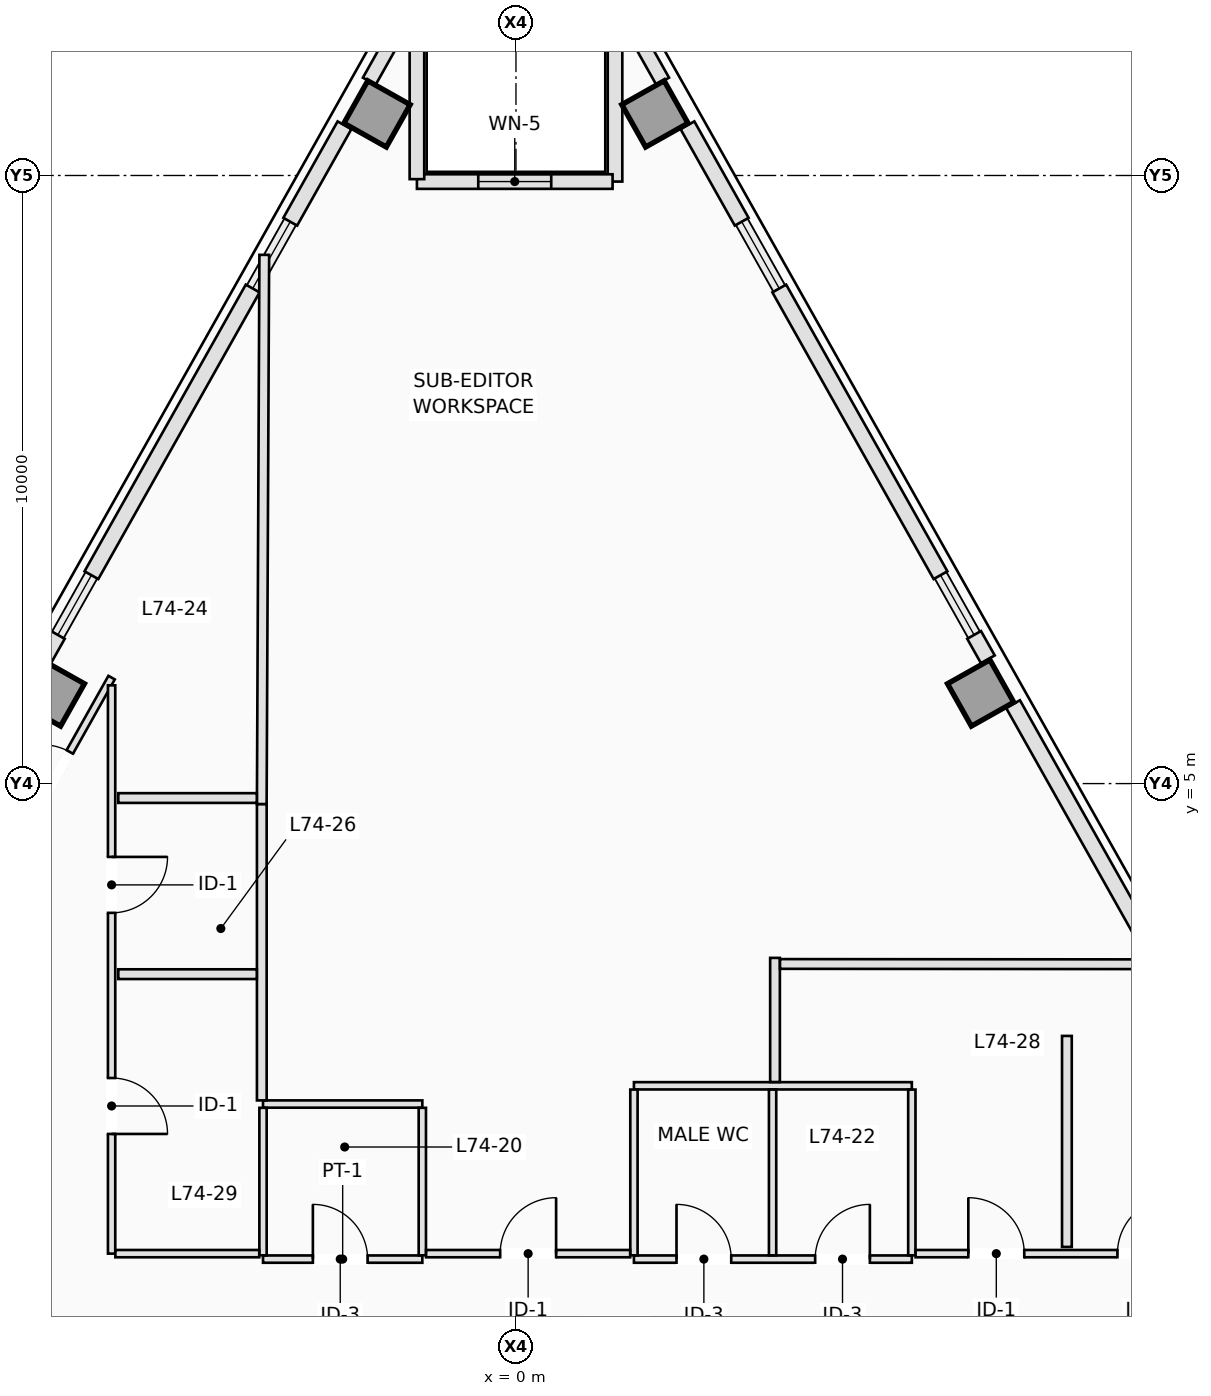
"""IFC4 building model, lengths in metres.
Left out: names, types, materials, properties, quantities, classifications, styles, units other than length and angle.
Written with IfcOpenShell. Run it as: python <this file> out.ifc"""

import sys

from ifc_helpers import new_model, si_unit, direction, frame, frame_2d, origin, origin_2d, place, context, subcontext, project, spatial, rectangle, extrude, element, fill, save


model = new_model("IFC4")
c1 = context("Model", 3, precision=1e-05, world=origin(), true_north=direction((0.0, 1.0)))
c2 = subcontext(c1, "Body", "Model", "MODEL_VIEW")
j1 = project(units=[si_unit("LENGTHUNIT", "METRE"), si_unit("PLANEANGLEUNIT", "RADIAN")], contexts=[c1])
p1 = place(None, origin())
s1 = spatial("IfcSite", under=j1, at=p1, CompositionType="ELEMENT")
p2 = place(p1, origin())
s2 = spatial("IfcBuilding", under=s1, at=p2, CompositionType="ELEMENT")
p3 = place(p2, frame((0.0, 0.0, 267.4)))
s3 = spatial("IfcBuildingStorey", under=s2, at=p3, CompositionType="ELEMENT", Elevation=267.4)
for number, where, z_axis, x_axis in (
    (1, (7.642, 6.489, 0.0), (0.0, 0.0, 1.0), (0.872, 0.49, 0.0)),
    (2, (2.285, 16.012, 0.0), (0.0, 0.0, 1.0), (0.872, 0.49, 0.0)),
    (3, (-2.285, 16.012, 0.0), (0.0, 0.0, 1.0), (-0.872, 0.49, 0.0)),
    (4, (-7.642, 6.489, 0.0), (0.0, 0.0, 1.0), (-0.872, 0.49, 0.0)),
):
    element("IfcColumn", number, at=place(p3, frame(where, z_axis=z_axis, x_axis=x_axis)), inside=s3, PredefinedType="COLUMN", context=c2, shape_type="SweptSolid", body=[
        extrude(rectangle(XDim=0.8, YDim=0.8, at=origin_2d()), origin(), (0.0, 0.0, 1.0), 3.5),
    ])
p4 = place(p3, frame((1.95, 17.373, 0.0), z_axis=(0.0, 0.0, 1.0), x_axis=(0.490199895283, -0.871610040479, 0.0)))
e5 = element("IfcWall", 5, at=p4, inside=s3, PredefinedType="STANDARD", context=c2, shape_type="SweptSolid", body=[
    extrude(rectangle(XDim=0.945, YDim=0.24, at=frame_2d((0.472, 0.0))), origin(), (0.0, 0.0, 1.0), 3.18),
])
p5 = place(p3, frame((2.82, 15.826, 0.0), z_axis=(0.0, 0.0, 1.0), x_axis=(0.490261239633, -0.871575537125, 0.0)))
e6 = element("IfcWall", 6, at=p5, inside=s3, PredefinedType="STANDARD", context=c2, shape_type="SweptSolid", body=[
    extrude(rectangle(XDim=1.82, YDim=0.26, at=frame_2d((0.91, 0.0))), origin(), (0.0, 0.0, 1.0), 3.18),
])
p6 = place(p3, frame((4.33, 13.142, 0.0), z_axis=(0.0, 0.0, 1.0), x_axis=(0.490265525523, -0.871573126297, 0.0)))
e7 = element("IfcWall", 7, at=p6, inside=s3, PredefinedType="STANDARD", context=c2, shape_type="SweptSolid", body=[
    extrude(rectangle(XDim=5.409, YDim=0.26, at=frame_2d((2.705, 0.0))), origin(), (0.0, 0.0, 1.0), 3.18),
])
p7 = place(p3, frame((7.534, 7.445, 0.0), z_axis=(0.0, 0.0, 1.0), x_axis=(0.490412424957, -0.871490478116, 0.0)))
e8 = element("IfcWall", 8, at=p7, inside=s3, PredefinedType="STANDARD", context=c2, shape_type="SweptSolid", body=[
    extrude(rectangle(XDim=0.46, YDim=0.26, at=frame_2d((0.23, 0.0))), origin(), (0.0, 0.0, 1.0), 3.18),
])
p8 = place(p3, frame((8.174, 6.307, 0.0), z_axis=(0.0, 0.0, 1.0), x_axis=(0.490269447258, -0.871570920284, 0.0)))
e9 = element("IfcWall", 9, at=p8, inside=s3, PredefinedType="STANDARD", context=c2, shape_type="SweptSolid", body=[
    extrude(rectangle(XDim=4.237, YDim=0.26, at=frame_2d((2.118, 0.0))), origin(), (0.0, 0.0, 1.0), 3.18),
])
p9 = place(p3, frame((-2.413, 16.549, 0.0), z_axis=(0.0, 0.0, 1.0), x_axis=(0.490199895283, 0.871610040479, 0.0)))
e10 = element("IfcWall", 10, at=p9, inside=s3, PredefinedType="STANDARD", context=c2, shape_type="SweptSolid", body=[
    extrude(rectangle(XDim=0.945, YDim=0.24, at=frame_2d((0.472, 0.0))), origin(), (0.0, 0.0, 1.0), 3.18),
])
p10 = place(p3, frame((-7.76, 7.044, 0.0), z_axis=(0.0, 0.0, 1.0), x_axis=(0.490412424957, 0.871490478116, 0.0)))
e11 = element("IfcWall", 11, at=p10, inside=s3, PredefinedType="STANDARD", context=c2, shape_type="SweptSolid", body=[
    extrude(rectangle(XDim=0.46, YDim=0.26, at=frame_2d((0.23, 0.0))), origin(), (0.0, 0.0, 1.0), 3.18),
])
p11 = place(p3, frame((-6.982, 8.427, 0.0), z_axis=(0.0, 0.0, 1.0), x_axis=(0.490265525523, 0.871573126297, 0.0)))
e12 = element("IfcWall", 12, at=p11, inside=s3, PredefinedType="STANDARD", context=c2, shape_type="SweptSolid", body=[
    extrude(rectangle(XDim=5.409, YDim=0.26, at=frame_2d((2.705, 0.0))), origin(), (0.0, 0.0, 1.0), 3.18),
])
p12 = place(p3, frame((-3.712, 14.24, 0.0), z_axis=(0.0, 0.0, 1.0), x_axis=(0.490261239633, 0.871575537125, 0.0)))
e13 = element("IfcWall", 13, at=p12, inside=s3, PredefinedType="STANDARD", context=c2, shape_type="SweptSolid", body=[
    extrude(rectangle(XDim=1.82, YDim=0.26, at=frame_2d((0.91, 0.0))), origin(), (0.0, 0.0, 1.0), 3.18),
])
p13 = place(p3, frame((1.629, 17.4, 0.0), z_axis=(0.0, 0.0, 1.0), x_axis=(0.0, -1.0, 0.0)))
e14 = element("IfcWall", 14, at=p13, inside=s3, PredefinedType="STANDARD", context=c2, shape_type="SweptSolid", body=[
    extrude(rectangle(XDim=2.5, YDim=0.24, at=frame_2d((1.25, 0.0))), origin(), (0.0, 0.0, 1.0), 3.18),
])
p14 = place(p3, frame((1.589, 14.9, 0.0), z_axis=(0.0, 0.0, 1.0), x_axis=(-1.0, 0.0, 0.0)))
e15 = element("IfcWall", 15, at=p14, inside=s3, PredefinedType="STANDARD", context=c2, shape_type="SweptSolid", body=[
    extrude(rectangle(XDim=3.218, YDim=0.24, at=frame_2d((1.609, 0.0))), origin(), (0.0, 0.0, 1.0), 3.18),
])
p15 = place(p14, frame((1.009, 0.0, 0.9)))
e16 = element("IfcOpeningElement", 16, at=p15, cuts=e15, PredefinedType="OPENING", context=c2, shape_type="SweptSolid", body=[
    extrude(rectangle(XDim=1.2, YDim=1.8, at=frame_2d((0.6, 0.9))), frame((0.0, 0.13, 0.0), z_axis=(0.0, -1.0, 0.0), x_axis=(1.0, 0.0, 0.0)), (0.0, 0.0, 1.0), 0.26),
])
p16 = place(p3, frame((-1.629, 14.94, 0.0), z_axis=(0.0, 0.0, 1.0), x_axis=(0.0, 1.0, 0.0)))
e17 = element("IfcWall", 17, at=p16, inside=s3, PredefinedType="STANDARD", context=c2, shape_type="SweptSolid", body=[
    extrude(rectangle(XDim=2.46, YDim=0.24, at=frame_2d((1.23, 0.0))), origin(), (0.0, 0.0, 1.0), 3.18),
])
p17 = place(p3, frame((-4.16, -2.82, 0.0), z_axis=(0.0, 0.0, 1.0), x_axis=(1.0, 0.0, 0.0)))
e18 = element("IfcWall", 18, at=p17, inside=s3, PredefinedType="PARTITIONING", context=c2, shape_type="SweptSolid", body=[
    extrude(rectangle(XDim=2.62, YDim=0.12, at=frame_2d((1.31, 0.0))), origin(), (0.0, 0.0, 1.0), 2.873),
])
p18 = place(p17, frame((0.82, 0.0, 0.0)))
e19 = element("IfcOpeningElement", 19, at=p18, cuts=e18, PredefinedType="OPENING", context=c2, shape_type="SweptSolid", body=[
    extrude(rectangle(XDim=0.9, YDim=2.12, at=frame_2d((0.45, 1.06))), frame((0.0, 0.07, 0.0), z_axis=(0.0, -1.0, 0.0), x_axis=(1.0, 0.0, 0.0)), (0.0, 0.0, 1.0), 0.14),
])
p19 = place(p3, frame((-4.16, -0.27, 0.0), z_axis=(0.0, 0.0, 1.0), x_axis=(1.0, 0.0, 0.0)))
e20 = element("IfcWall", 20, at=p19, inside=s3, PredefinedType="PARTITIONING", context=c2, shape_type="SweptSolid", body=[
    extrude(rectangle(XDim=2.62, YDim=0.12, at=frame_2d((1.31, 0.0))), origin(), (0.0, 0.0, 1.0), 3.18),
])
for number, where, z_axis, x_axis in (
    (21, (-4.16, -2.758, 0.0), (0.0, 0.0, 1.0), (0.0, 1.0, 0.0)),
    (22, (-1.54, -2.758, 0.0), (0.0, 0.0, 1.0), (0.0, 1.0, 0.0)),
):
    element("IfcWall", number, at=place(p3, frame(where, z_axis=z_axis, x_axis=x_axis)), inside=s3, PredefinedType="PARTITIONING", context=c2, shape_type="SweptSolid", body=[
        extrude(rectangle(XDim=2.426, YDim=0.12, at=frame_2d((1.213, 0.0))), origin(), (0.0, 0.0, 1.0), 3.18),
    ])
p20 = place(p3, frame((1.94, -2.82, 0.0), z_axis=(0.0, 0.0, 1.0), x_axis=(1.0, 0.0, 0.0)))
e23 = element("IfcWall", 23, at=p20, inside=s3, PredefinedType="PARTITIONING", context=c2, shape_type="SweptSolid", body=[
    extrude(rectangle(XDim=4.57, YDim=0.12, at=frame_2d((2.285, 0.0))), origin(), (0.0, 0.0, 1.0), 2.873),
])
p21 = place(p20, frame((0.7, 0.0, 0.0)))
e24 = element("IfcOpeningElement", 24, at=p21, cuts=e23, PredefinedType="OPENING", context=c2, shape_type="SweptSolid", body=[
    extrude(rectangle(XDim=0.9, YDim=2.12, at=frame_2d((0.45, 1.06))), frame((0.0, 0.07, 0.0), z_axis=(0.0, -1.0, 0.0), x_axis=(1.0, 0.0, 0.0)), (0.0, 0.0, 1.0), 0.14),
])
p22 = place(p20, frame((2.98, 0.0, 0.0)))
e25 = element("IfcOpeningElement", 25, at=p22, cuts=e23, PredefinedType="OPENING", context=c2, shape_type="SweptSolid", body=[
    extrude(rectangle(XDim=0.9, YDim=2.12, at=frame_2d((0.45, 1.06))), frame((0.0, 0.07, 0.0), z_axis=(0.0, -1.0, 0.0), x_axis=(1.0, 0.0, 0.0)), (0.0, 0.0, 1.0), 0.14),
])
p23 = place(p3, frame((1.94, 0.03, 0.0), z_axis=(0.0, 0.0, 1.0), x_axis=(1.0, 0.0, 0.0)))
e26 = element("IfcWall", 26, at=p23, inside=s3, PredefinedType="PARTITIONING", context=c2, shape_type="SweptSolid", body=[
    extrude(rectangle(XDim=4.57, YDim=0.12, at=frame_2d((2.285, 0.0))), origin(), (0.0, 0.0, 1.0), 3.18),
])
for number, where, z_axis, x_axis in (
    (27, (1.94, -2.758, 0.0), (0.0, 0.0, 1.0), (0.0, 1.0, 0.0)),
    (28, (4.22, -2.758, 0.0), (0.0, 0.0, 1.0), (0.0, 1.0, 0.0)),
    (29, (6.51, -2.758, 0.0), (0.0, 0.0, 1.0), (0.0, 1.0, 0.0)),
):
    element("IfcWall", number, at=place(p3, frame(where, z_axis=z_axis, x_axis=x_axis)), inside=s3, PredefinedType="PARTITIONING", context=c2, shape_type="SweptSolid", body=[
        extrude(rectangle(XDim=2.726, YDim=0.12, at=frame_2d((1.363, 0.0))), origin(), (0.0, 0.0, 1.0), 3.18),
    ])
p24 = place(p3, frame((-8.049, 4.256, 0.0), z_axis=(0.0, 0.0, 1.0), x_axis=(0.490249053239, 0.871582391859, 0.0)))
e30 = element("IfcWall", 30, at=p24, inside=s3, PredefinedType="PARTITIONING", context=c2, shape_type="SweptSolid", body=[
    extrude(rectangle(XDim=2.854, YDim=0.12, at=frame_2d((1.427, 0.0))), origin(), (0.0, 0.0, 1.0), 3.18),
])
p25 = place(p24, frame((0.531, 0.0, 0.0)))
e31 = element("IfcOpeningElement", 31, at=p25, cuts=e30, PredefinedType="OPENING", context=c2, shape_type="SweptSolid", body=[
    extrude(rectangle(XDim=0.92, YDim=2.12, at=frame_2d((0.46, 1.06))), frame((0.0, 0.07, 0.0), z_axis=(0.0, -1.0, 0.0), x_axis=(1.0, 0.0, 0.0)), (0.0, 0.0, 1.0), 0.14),
])
p26 = place(p3, frame((-6.65, 6.616, 0.0), z_axis=(0.0, 0.0, 1.0), x_axis=(0.0, -1.0, 0.0)))
e32 = element("IfcWall", 32, at=p26, inside=s3, PredefinedType="PARTITIONING", context=c2, shape_type="SweptSolid", body=[
    extrude(rectangle(XDim=9.346, YDim=0.12, at=frame_2d((4.673, 0.0))), origin(), (0.0, 0.0, 1.0), 3.18),
])
p27 = place(p26, frame((2.822, 0.0, 0.0)))
e33 = element("IfcOpeningElement", 33, at=p27, cuts=e32, PredefinedType="OPENING", context=c2, shape_type="SweptSolid", body=[
    extrude(rectangle(XDim=0.92, YDim=2.12, at=frame_2d((0.46, 1.06))), frame((0.0, 0.07, 0.0), z_axis=(0.0, -1.0, 0.0), x_axis=(1.0, 0.0, 0.0)), (0.0, 0.0, 1.0), 0.14),
])
p28 = place(p26, frame((6.458, 0.0, 0.0)))
e34 = element("IfcOpeningElement", 34, at=p28, cuts=e32, PredefinedType="OPENING", context=c2, shape_type="SweptSolid", body=[
    extrude(rectangle(XDim=0.92, YDim=2.12, at=frame_2d((0.46, 1.06))), frame((0.0, 0.07, 0.0), z_axis=(0.0, -1.0, 0.0), x_axis=(1.0, 0.0, 0.0)), (0.0, 0.0, 1.0), 0.14),
])
p29 = place(p3, frame((-6.588, -2.73, 0.0), z_axis=(0.0, 0.0, 1.0), x_axis=(1.0, 0.0, 0.0)))
e35 = element("IfcWall", 35, at=p29, inside=s3, PredefinedType="PARTITIONING", context=c2, shape_type="SweptSolid", body=[
    extrude(rectangle(XDim=2.366, YDim=0.12, at=frame_2d((1.183, 0.0))), origin(), (0.0, 0.0, 1.0), 3.18),
])
p30 = place(p3, frame((-1.478, -2.73, 0.0), z_axis=(0.0, 0.0, 1.0), x_axis=(1.0, 0.0, 0.0)))
e36 = element("IfcWall", 36, at=p30, inside=s3, PredefinedType="PARTITIONING", context=c2, shape_type="SweptSolid", body=[
    extrude(rectangle(XDim=3.356, YDim=0.12, at=frame_2d((1.678, 0.0))), origin(), (0.0, 0.0, 1.0), 2.873),
])
p31 = place(p30, frame((1.218, 0.0, 0.0)))
e37 = element("IfcOpeningElement", 37, at=p31, cuts=e36, PredefinedType="OPENING", context=c2, shape_type="SweptSolid", body=[
    extrude(rectangle(XDim=0.92, YDim=2.12, at=frame_2d((0.46, 1.06))), frame((0.0, 0.07, 0.0), z_axis=(0.0, -1.0, 0.0), x_axis=(1.0, 0.0, 0.0)), (0.0, 0.0, 1.0), 0.14),
])
p32 = place(p3, frame((6.572, -2.73, 0.0), z_axis=(0.0, 0.0, 1.0), x_axis=(1.0, 0.0, 0.0)))
e38 = element("IfcWall", 38, at=p32, inside=s3, PredefinedType="PARTITIONING", context=c2, shape_type="SweptSolid", body=[
    extrude(rectangle(XDim=5.328, YDim=0.12, at=frame_2d((2.664, 0.0))), origin(), (0.0, 0.0, 1.0), 3.18),
])
p33 = place(p32, frame((0.867, 0.0, 0.0)))
e39 = element("IfcOpeningElement", 39, at=p33, cuts=e38, PredefinedType="OPENING", context=c2, shape_type="SweptSolid", body=[
    extrude(rectangle(XDim=0.92, YDim=2.12, at=frame_2d((0.46, 1.06))), frame((0.0, 0.07, 0.0), z_axis=(0.0, -1.0, 0.0), x_axis=(1.0, 0.0, 0.0)), (0.0, 0.0, 1.0), 0.14),
])
p34 = place(p32, frame((3.319, 0.0, 0.0)))
e40 = element("IfcOpeningElement", 40, at=p34, cuts=e38, PredefinedType="OPENING", context=c2, shape_type="SweptSolid", body=[
    extrude(rectangle(XDim=0.92, YDim=2.12, at=frame_2d((0.46, 1.06))), frame((0.0, 0.07, 0.0), z_axis=(0.0, -1.0, 0.0), x_axis=(1.0, 0.0, 0.0)), (0.0, 0.0, 1.0), 0.14),
])
p35 = place(p3, frame((-4.139, 13.695, 0.0), z_axis=(0.0, 0.0, 1.0), x_axis=(-0.004567766824, -0.999989567699, 0.0)))
e41 = element("IfcWall", 41, at=p35, inside=s3, PredefinedType="PARTITIONING", context=c2, shape_type="SweptSolid", body=[
    extrude(rectangle(XDim=9.033, YDim=0.16, at=frame_2d((4.516, 0.0))), origin(), (0.0, 0.0, 1.0), 3.18),
])
p36 = place(p3, frame((-4.262, 4.762, 0.0), z_axis=(0.0, 0.0, 1.0), x_axis=(-1.0, 0.0, 0.0)))
e42 = element("IfcWall", 42, at=p36, inside=s3, PredefinedType="PARTITIONING", context=c2, shape_type="SweptSolid", body=[
    extrude(rectangle(XDim=2.278, YDim=0.16, at=frame_2d((1.139, 0.0))), origin(), (0.0, 0.0, 1.0), 2.873),
])
p37 = place(p3, frame((-4.18, -0.21, 0.0), z_axis=(0.0, 0.0, 1.0), x_axis=(0.0, 1.0, 0.0)))
e43 = element("IfcWall", 43, at=p37, inside=s3, PredefinedType="PARTITIONING", context=c2, shape_type="SweptSolid", body=[
    extrude(rectangle(XDim=4.87, YDim=0.16, at=frame_2d((2.435, 0.0))), origin(), (0.0, 0.0, 1.0), 3.18),
])
p38 = place(p3, frame((4.26, 2.134, 0.0), z_axis=(0.0, 0.0, 1.0), x_axis=(0.0, -1.0, 0.0)))
e44 = element("IfcWall", 44, at=p38, inside=s3, PredefinedType="PARTITIONING", context=c2, shape_type="SweptSolid", body=[
    extrude(rectangle(XDim=2.042, YDim=0.16, at=frame_2d((1.021, 0.0))), origin(), (0.0, 0.0, 1.0), 3.18),
])
p39 = place(p3, frame((10.701, 2.029, 0.0), z_axis=(0.0, 0.0, 1.0), x_axis=(-0.999999705232, 0.000767813041, 0.0)))
e45 = element("IfcWall", 45, at=p39, inside=s3, PredefinedType="PARTITIONING", context=c2, shape_type="SweptSolid", body=[
    extrude(rectangle(XDim=6.359, YDim=0.16, at=frame_2d((3.18, 0.0))), origin(), (0.0, 0.0, 1.0), 2.873),
])
p40 = place(p3, frame((-4.262, 1.866, 0.0), z_axis=(0.0, 0.0, 1.0), x_axis=(-1.0, 0.0, 0.0)))
e46 = element("IfcWall", 46, at=p40, inside=s3, PredefinedType="PARTITIONING", context=c2, shape_type="SweptSolid", body=[
    extrude(rectangle(XDim=2.278, YDim=0.16, at=frame_2d((1.139, 0.0))), origin(), (0.0, 0.0, 1.0), 2.873),
])
p41 = place(p3, frame((9.06, 0.85, 0.0), z_axis=(0.0, 0.0, 1.0), x_axis=(0.0, -1.0, 0.0)))
e47 = element("IfcWall", 47, at=p41, inside=s3, PredefinedType="PARTITIONING", context=c2, shape_type="SweptSolid", body=[
    extrude(rectangle(XDim=3.47, YDim=0.16, at=frame_2d((1.735, 0.0))), origin(), (0.0, 0.0, 1.0), 3.18),
])
p42 = place(p15, origin())
e48 = element("IfcWindow", 48, at=p42, inside=s3, PartitioningType="SINGLE_PANEL", PredefinedType="WINDOW", context=c2, shape_type="SweptSolid", body=[
    extrude(rectangle(XDim=1.2, YDim=1.8, at=frame_2d((0.6, 0.9))), frame((0.0, 0.03, 0.0), z_axis=(0.0, -1.0, 0.0), x_axis=(1.0, 0.0, 0.0)), (0.0, 0.0, 1.0), 0.06),
])
fill(e16, e48)
p43 = place(p18, origin())
e49 = element("IfcDoor", 49, at=p43, inside=s3, OperationType="SINGLE_SWING_LEFT", PredefinedType="DOOR", context=c2, shape_type="SweptSolid", body=[
    extrude(rectangle(XDim=0.9, YDim=2.12, at=frame_2d((0.45, 1.06))), frame((0.0, 0.025, 0.0), z_axis=(0.0, -1.0, 0.0), x_axis=(1.0, 0.0, 0.0)), (0.0, 0.0, 1.0), 0.05),
])
fill(e19, e49)
p44 = place(p21, origin())
e50 = element("IfcDoor", 50, at=p44, inside=s3, OperationType="SINGLE_SWING_LEFT", PredefinedType="DOOR", context=c2, shape_type="SweptSolid", body=[
    extrude(rectangle(XDim=0.9, YDim=2.12, at=frame_2d((0.45, 1.06))), frame((0.0, 0.025, 0.0), z_axis=(0.0, -1.0, 0.0), x_axis=(1.0, 0.0, 0.0)), (0.0, 0.0, 1.0), 0.05),
])
fill(e24, e50)
p45 = place(p22, origin())
e51 = element("IfcDoor", 51, at=p45, inside=s3, OperationType="SINGLE_SWING_RIGHT", PredefinedType="DOOR", context=c2, shape_type="SweptSolid", body=[
    extrude(rectangle(XDim=0.9, YDim=2.12, at=frame_2d((0.45, 1.06))), frame((0.0, 0.025, 0.0), z_axis=(0.0, -1.0, 0.0), x_axis=(1.0, 0.0, 0.0)), (0.0, 0.0, 1.0), 0.05),
])
fill(e25, e51)
p46 = place(p25, origin())
e52 = element("IfcDoor", 52, at=p46, inside=s3, OperationType="SINGLE_SWING_LEFT", PredefinedType="DOOR", context=c2, shape_type="SweptSolid", body=[
    extrude(rectangle(XDim=0.92, YDim=2.12, at=frame_2d((0.46, 1.06))), frame((0.0, 0.025, 0.0), z_axis=(0.0, -1.0, 0.0), x_axis=(1.0, 0.0, 0.0)), (0.0, 0.0, 1.0), 0.05),
])
fill(e31, e52)
p47 = place(p31, origin())
e53 = element("IfcDoor", 53, at=p47, inside=s3, OperationType="SINGLE_SWING_RIGHT", PredefinedType="DOOR", context=c2, shape_type="SweptSolid", body=[
    extrude(rectangle(XDim=0.92, YDim=2.12, at=frame_2d((0.46, 1.06))), frame((0.0, 0.025, 0.0), z_axis=(0.0, -1.0, 0.0), x_axis=(1.0, 0.0, 0.0)), (0.0, 0.0, 1.0), 0.05),
])
fill(e37, e53)
p48 = place(p27, origin())
e54 = element("IfcDoor", 54, at=p48, inside=s3, OperationType="SINGLE_SWING_LEFT", PredefinedType="DOOR", context=c2, shape_type="SweptSolid", body=[
    extrude(rectangle(XDim=0.92, YDim=2.12, at=frame_2d((0.46, 1.06))), frame((0.0, 0.025, 0.0), z_axis=(0.0, -1.0, 0.0), x_axis=(1.0, 0.0, 0.0)), (0.0, 0.0, 1.0), 0.05),
])
fill(e33, e54)
p49 = place(p33, origin())
e55 = element("IfcDoor", 55, at=p49, inside=s3, OperationType="SINGLE_SWING_LEFT", PredefinedType="DOOR", context=c2, shape_type="SweptSolid", body=[
    extrude(rectangle(XDim=0.92, YDim=2.12, at=frame_2d((0.46, 1.06))), frame((0.0, 0.025, 0.0), z_axis=(0.0, -1.0, 0.0), x_axis=(1.0, 0.0, 0.0)), (0.0, 0.0, 1.0), 0.05),
])
fill(e39, e55)
p50 = place(p28, origin())
e56 = element("IfcDoor", 56, at=p50, inside=s3, OperationType="SINGLE_SWING_RIGHT", PredefinedType="DOOR", context=c2, shape_type="SweptSolid", body=[
    extrude(rectangle(XDim=0.92, YDim=2.12, at=frame_2d((0.46, 1.06))), frame((0.0, 0.025, 0.0), z_axis=(0.0, -1.0, 0.0), x_axis=(1.0, 0.0, 0.0)), (0.0, 0.0, 1.0), 0.05),
])
fill(e34, e56)
p51 = place(p34, origin())
e57 = element("IfcDoor", 57, at=p51, inside=s3, OperationType="SINGLE_SWING_RIGHT", PredefinedType="DOOR", context=c2, shape_type="SweptSolid", body=[
    extrude(rectangle(XDim=0.92, YDim=2.12, at=frame_2d((0.46, 1.06))), frame((0.0, 0.025, 0.0), z_axis=(0.0, -1.0, 0.0), x_axis=(1.0, 0.0, 0.0)), (0.0, 0.0, 1.0), 0.05),
])
fill(e40, e57)
save(model, sys.argv[1])
